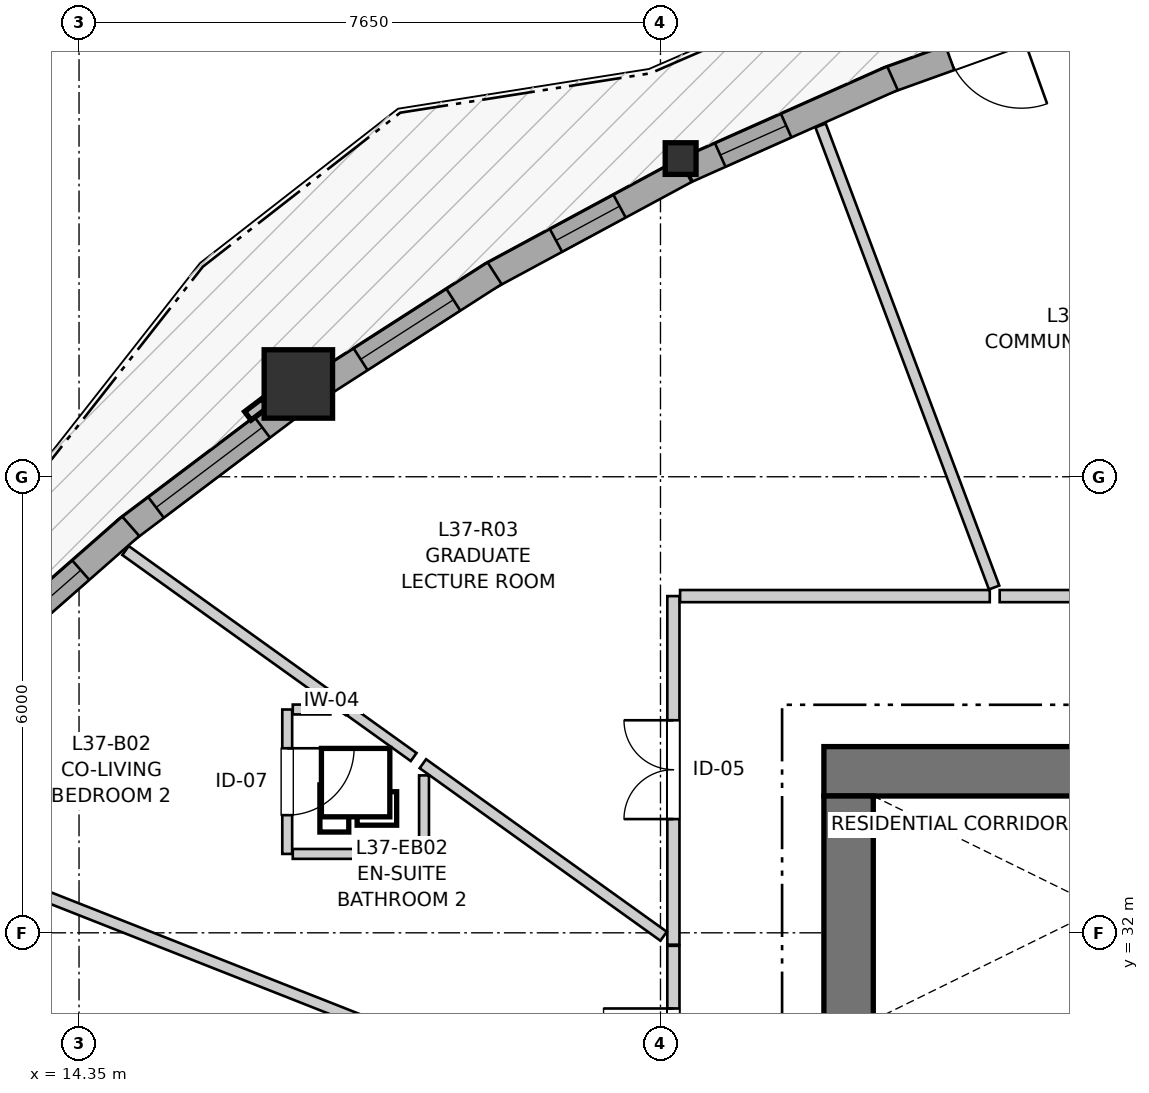
"""IFC4 building model, lengths in metres.
Left out: names, types, materials, properties, quantities, classifications, styles, units other than length and angle.
Written with IfcOpenShell. Run it as: python <this file> out.ifc"""

import sys

from ifc_helpers import new_model, si_unit, direction, frame, frame_2d, origin, origin_2d, place, context, subcontext, project, spatial, rectangle, i_section, extrude, source, transform, mapped, element, fill, save


model = new_model("IFC4")
c1 = context("Model", 3, precision=1e-05, world=origin(), true_north=direction((0.0, 1.0)))
c2 = subcontext(c1, "Body", "Model", "MODEL_VIEW")
j1 = project(units=[si_unit("LENGTHUNIT", "METRE"), si_unit("PLANEANGLEUNIT", "RADIAN")], contexts=[c1])
p1 = place(None, origin())
s1 = spatial("IfcSite", under=j1, at=p1, CompositionType="ELEMENT")
p2 = place(p1, origin())
s2 = spatial("IfcBuilding", under=s1, at=p2, CompositionType="ELEMENT")
p3 = place(p2, frame((0.0, 0.0, 124.8)))
s3 = spatial("IfcBuildingStorey", under=s2, at=p3, CompositionType="ELEMENT", Elevation=124.8)
p4 = place(p3, frame((36.55, 34.125, 0.0), z_axis=(0.0, 0.0, 1.0), x_axis=(-1.0, 0.0, 0.0)))
e1 = element("IfcWall", 1, at=p4, inside=s3, PredefinedType="SHEAR", context=c2, shape_type="SweptSolid", body=[
    extrude(rectangle(XDim=12.4, YDim=0.65, at=frame_2d((6.2, 0.0))), origin(), (0.0, 0.0, 1.0), 2.9),
])
p5 = place(p3, frame((24.475, 33.8, 0.0), z_axis=(0.0, 0.0, 1.0), x_axis=(0.0, -1.0, 0.0)))
e2 = element("IfcWall", 2, at=p5, inside=s3, PredefinedType="SHEAR", context=c2, shape_type="SweptSolid", body=[
    extrude(rectangle(XDim=15.6, YDim=0.65, at=frame_2d((7.8, 0.0))), origin(), (0.0, 0.0, 1.0), 2.9),
])
p6 = place(p5, frame((7.05, 0.0, 0.0)))
e3 = element("IfcOpeningElement", 3, at=p6, cuts=e2, PredefinedType="OPENING", context=c2, shape_type="SweptSolid", body=[
    extrude(rectangle(XDim=1.5, YDim=2.15, at=frame_2d((0.75, 1.075))), frame((0.0, 0.335, 0.0), z_axis=(0.0, -1.0, 0.0), x_axis=(1.0, 0.0, 0.0)), (0.0, 0.0, 1.0), 0.67),
])
p7 = place(p5, frame((3.52, 0.0, 0.0)))
e4 = element("IfcOpeningElement", 4, at=p7, cuts=e2, PredefinedType="OPENING", context=c2, shape_type="SweptSolid", body=[
    extrude(rectangle(XDim=0.86, YDim=2.05, at=frame_2d((0.43, 1.025))), frame((0.0, 0.335, 0.0), z_axis=(0.0, -1.0, 0.0), x_axis=(1.0, 0.0, 0.0)), (0.0, 0.0, 1.0), 0.67),
])
p8 = place(p5, frame((11.22, 0.0, 0.0)))
e5 = element("IfcOpeningElement", 5, at=p8, cuts=e2, PredefinedType="OPENING", context=c2, shape_type="SweptSolid", body=[
    extrude(rectangle(XDim=0.86, YDim=2.05, at=frame_2d((0.43, 1.025))), frame((0.0, 0.335, 0.0), z_axis=(0.0, -1.0, 0.0), x_axis=(1.0, 0.0, 0.0)), (0.0, 0.0, 1.0), 0.67),
])
m1 = source(origin(), c2, "Body", "SweptSolid", [
    extrude(i_section(OverallWidth=0.406, OverallDepth=0.416, WebThickness=0.027, FlangeThickness=0.044, FilletRadius=0.015, at=origin_2d()), origin(), (0.0, 0.0, 1.0), 2.9),
])
p9 = place(p3, frame((22.265, 42.186, 0.0), z_axis=(0.0, 0.0, 1.0), x_axis=(1.0, 0.0, 0.0)))
e6 = element("IfcColumn", 6, at=p9, inside=s3, PredefinedType="PILASTER", context=c2, shape_type="MappedRepresentation", body=[
    mapped(m1, transform((0.0, 0.0, 0.0), x_axis=(1.0, 0.0, 0.0), y_axis=(0.0, 1.0, 0.0), z_axis=(0.0, 0.0, 1.0), scale=1.0)),
])
m2 = source(origin(), c2, "Body", "SweptSolid", [
    extrude(rectangle(XDim=0.9, YDim=0.9, at=origin_2d()), origin(), (0.0, 0.0, 1.0), 2.9),
])
p10 = place(p3, frame((17.236, 39.221, 0.0), z_axis=(0.0, 0.0, 1.0), x_axis=(1.0, 0.0, 0.0)))
e7 = element("IfcColumn", 7, at=p10, inside=s3, PredefinedType="COLUMN", context=c2, shape_type="MappedRepresentation", body=[
    mapped(m2, transform((0.0, 0.0, 0.0), x_axis=(1.0, 0.0, 0.0), y_axis=(0.0, 1.0, 0.0), z_axis=(0.0, 0.0, 1.0), scale=1.0)),
])
p11 = place(p3, frame((27.586, 44.149, 0.0), z_axis=(0.0, 0.0, 1.0), x_axis=(-0.941112277287, -0.338094190338, 0.0)))
e8 = element("IfcWall", 8, at=p11, inside=s3, PredefinedType="SOLIDWALL", context=c2, shape_type="SweptSolid", body=[
    extrude(rectangle(XDim=2.779, YDim=0.34, at=frame_2d((1.39, 0.0))), origin(), (0.0, 0.0, 1.0), 2.43),
])
p12 = place(p11, frame((0.89, 0.0, 0.0)))
e9 = element("IfcOpeningElement", 9, at=p12, cuts=e8, PredefinedType="OPENING", context=c2, shape_type="SweptSolid", body=[
    extrude(rectangle(XDim=1.0, YDim=2.1, at=frame_2d((0.5, 1.05))), frame((0.0, 0.18, 0.0), z_axis=(0.0, -1.0, 0.0), x_axis=(1.0, 0.0, 0.0)), (0.0, 0.0, 1.0), 0.36),
])
p13 = place(p3, frame((25.053, 43.243, 0.0), z_axis=(0.0, 0.0, 1.0), x_axis=(-0.91339900063, -0.407065431655, 0.0)))
e10 = element("IfcWall", 10, at=p13, inside=s3, PredefinedType="SOLIDWALL", context=c2, shape_type="SweptSolid", body=[
    extrude(rectangle(XDim=2.956, YDim=0.34, at=frame_2d((1.478, 0.0))), origin(), (0.0, 0.0, 1.0), 2.43),
])
p14 = place(p13, frame((1.531, 0.0, 0.82)))
e11 = element("IfcOpeningElement", 11, at=p14, cuts=e10, PredefinedType="OPENING", context=c2, shape_type="SweptSolid", body=[
    extrude(rectangle(XDim=0.95, YDim=1.35, at=frame_2d((0.475, 0.675))), frame((0.0, 0.18, 0.0), z_axis=(0.0, -1.0, 0.0), x_axis=(1.0, 0.0, 0.0)), (0.0, 0.0, 1.0), 0.36),
])
p15 = place(p3, frame((22.328, 42.027, 0.0), z_axis=(0.0, 0.0, 1.0), x_axis=(-0.880092136679, -0.474802939077, 0.0)))
e12 = element("IfcWall", 12, at=p15, inside=s3, PredefinedType="SOLIDWALL", context=c2, shape_type="SweptSolid", body=[
    extrude(rectangle(XDim=2.94, YDim=0.34, at=frame_2d((1.47, 0.0))), origin(), (0.0, 0.0, 1.0), 2.43),
])
p16 = place(p15, frame((0.985, 0.0, 0.82)))
e13 = element("IfcOpeningElement", 13, at=p16, cuts=e12, PredefinedType="OPENING", context=c2, shape_type="SweptSolid", body=[
    extrude(rectangle(XDim=0.95, YDim=1.35, at=frame_2d((0.475, 0.675))), frame((0.0, 0.18, 0.0), z_axis=(0.0, -1.0, 0.0), x_axis=(1.0, 0.0, 0.0)), (0.0, 0.0, 1.0), 0.36),
])
p17 = place(p3, frame((19.818, 40.677, 0.0), z_axis=(0.0, 0.0, 1.0), x_axis=(-0.841503814414, -0.540251173369, 0.0)))
e14 = element("IfcWall", 14, at=p17, inside=s3, PredefinedType="SOLIDWALL", context=c2, shape_type="SweptSolid", body=[
    extrude(rectangle(XDim=2.729, YDim=0.34, at=frame_2d((1.365, 0.0))), origin(), (0.0, 0.0, 1.0), 2.43),
])
p18 = place(p17, frame((0.645, 0.0, 0.82)))
e15 = element("IfcOpeningElement", 15, at=p18, cuts=e14, PredefinedType="OPENING", context=c2, shape_type="SweptSolid", body=[
    extrude(rectangle(XDim=1.45, YDim=1.25, at=frame_2d((0.725, 0.625))), frame((0.0, 0.18, 0.0), z_axis=(0.0, -1.0, 0.0), x_axis=(1.0, 0.0, 0.0)), (0.0, 0.0, 1.0), 0.36),
])
p19 = place(p3, frame((17.154, 38.947, 0.0), z_axis=(0.0, 0.0, 1.0), x_axis=(-0.798332692302, -0.602216665663, 0.0)))
e16 = element("IfcWall", 16, at=p19, inside=s3, PredefinedType="SOLIDWALL", context=c2, shape_type="SweptSolid", body=[
    extrude(rectangle(XDim=2.746, YDim=0.34, at=frame_2d((1.373, 0.0))), origin(), (0.0, 0.0, 1.0), 2.43),
])
p20 = place(p19, frame((0.493, 0.0, 0.82)))
e17 = element("IfcOpeningElement", 17, at=p20, cuts=e16, PredefinedType="OPENING", context=c2, shape_type="SweptSolid", body=[
    extrude(rectangle(XDim=1.75, YDim=1.3, at=frame_2d((0.875, 0.65))), frame((0.0, 0.18, 0.0), z_axis=(0.0, -1.0, 0.0), x_axis=(1.0, 0.0, 0.0)), (0.0, 0.0, 1.0), 0.36),
])
p21 = place(p3, frame((15.031, 37.349, 0.0), z_axis=(0.0, 0.0, 1.0), x_axis=(-0.751472812955, -0.659764057364, 0.0)))
e18 = element("IfcWall", 18, at=p21, inside=s3, PredefinedType="SOLIDWALL", context=c2, shape_type="SweptSolid", body=[
    extrude(rectangle(XDim=2.99, YDim=0.34, at=frame_2d((1.495, 0.0))), origin(), (0.0, 0.0, 1.0), 2.43),
])
p22 = place(p21, frame((0.875, 0.0, 0.82)))
e19 = element("IfcOpeningElement", 19, at=p22, cuts=e18, PredefinedType="OPENING", context=c2, shape_type="SweptSolid", body=[
    extrude(rectangle(XDim=1.45, YDim=1.25, at=frame_2d((0.725, 0.625))), frame((0.0, 0.18, 0.0), z_axis=(0.0, -1.0, 0.0), x_axis=(1.0, 0.0, 0.0)), (0.0, 0.0, 1.0), 0.36),
])
p23 = place(p3, frame((22.17, 31.844, 0.0), z_axis=(0.0, 0.0, 1.0), x_axis=(0.0, 1.0, 0.0)))
e20 = element("IfcWall", 20, at=p23, inside=s3, PredefinedType="PARTITIONING", context=c2, shape_type="SweptSolid", body=[
    extrude(rectangle(XDim=4.586, YDim=0.16, at=frame_2d((2.293, 0.0))), origin(), (0.0, 0.0, 1.0), 2.9),
])
p24 = place(p23, frame((1.653, 0.0, 0.0)))
e21 = element("IfcOpeningElement", 21, at=p24, cuts=e20, PredefinedType="OPENING", context=c2, shape_type="SweptSolid", body=[
    extrude(rectangle(XDim=1.3, YDim=2.1, at=frame_2d((0.65, 1.05))), frame((0.0, 0.09, 0.0), z_axis=(0.0, -1.0, 0.0), x_axis=(1.0, 0.0, 0.0)), (0.0, 0.0, 1.0), 0.18),
])
p25 = place(p3, frame((26.463, 36.43, 0.0), z_axis=(0.0, 0.0, 1.0), x_axis=(1.0, 0.0, 0.0)))
e22 = element("IfcWall", 22, at=p25, inside=s3, PredefinedType="PARTITIONING", context=c2, shape_type="SweptSolid", body=[
    extrude(rectangle(XDim=3.585, YDim=0.16, at=frame_2d((1.792, 0.0))), origin(), (0.0, 0.0, 1.0), 2.9),
])
p26 = place(p25, frame((1.119, 0.0, 0.0)))
e23 = element("IfcOpeningElement", 23, at=p26, cuts=e22, PredefinedType="OPENING", context=c2, shape_type="SweptSolid", body=[
    extrude(rectangle(XDim=1.3, YDim=2.1, at=frame_2d((0.65, 1.05))), frame((0.0, 0.09, 0.0), z_axis=(0.0, -1.0, 0.0), x_axis=(1.0, 0.0, 0.0)), (0.0, 0.0, 1.0), 0.18),
])
p27 = place(p3, frame((22.17, 29.209, 0.0), z_axis=(0.0, 0.0, 1.0), x_axis=(0.0, 1.0, 0.0)))
e24 = element("IfcWall", 24, at=p27, inside=s3, PredefinedType="PARTITIONING", context=c2, shape_type="SweptSolid", body=[
    extrude(rectangle(XDim=2.62, YDim=0.16, at=frame_2d((1.31, 0.0))), origin(), (0.0, 0.0, 1.0), 2.9),
])
p28 = place(p27, frame((0.875, 0.0, 0.0)))
e25 = element("IfcOpeningElement", 25, at=p28, cuts=e24, PredefinedType="OPENING", context=c2, shape_type="SweptSolid", body=[
    extrude(rectangle(XDim=0.92, YDim=2.1, at=frame_2d((0.46, 1.05))), frame((0.0, 0.09, 0.0), z_axis=(0.0, -1.0, 0.0), x_axis=(1.0, 0.0, 0.0)), (0.0, 0.0, 1.0), 0.18),
])
p29 = place(p3, frame((17.089, 34.938, 0.0), z_axis=(0.0, 0.0, 1.0), x_axis=(0.0, -1.0, 0.0)))
e26 = element("IfcWall", 26, at=p29, inside=s3, PredefinedType="PARTITIONING", context=c2, shape_type="SweptSolid", body=[
    extrude(rectangle(XDim=1.9, YDim=0.13, at=frame_2d((0.95, 0.0))), origin(), (0.0, 0.0, 1.0), 2.9),
])
p30 = place(p29, frame((0.51, 0.0, 0.0)))
e27 = element("IfcOpeningElement", 27, at=p30, cuts=e26, PredefinedType="OPENING", context=c2, shape_type="SweptSolid", body=[
    extrude(rectangle(XDim=0.88, YDim=2.05, at=frame_2d((0.44, 1.025))), frame((0.0, 0.075, 0.0), z_axis=(0.0, -1.0, 0.0), x_axis=(1.0, 0.0, 0.0)), (0.0, 0.0, 1.0), 0.15),
])
p31 = place(p3, frame((11.228, 33.54, 0.0), z_axis=(0.0, 0.0, 1.0), x_axis=(0.930301058265, -0.366796866114, 0.0)))
e28 = element("IfcWall", 28, at=p31, inside=s3, PredefinedType="PARTITIONING", context=c2, shape_type="SweptSolid", body=[
    extrude(rectangle(XDim=11.639, YDim=0.145, at=frame_2d((5.82, 0.0))), origin(), (0.0, 0.0, 1.0), 2.9),
])
p32 = place(p3, frame((24.107, 42.621, 0.0), z_axis=(0.0, 0.0, 1.0), x_axis=(0.351605509999, -0.93614826034, 0.0)))
e29 = element("IfcWall", 29, at=p32, inside=s3, PredefinedType="PARTITIONING", context=c2, shape_type="SweptSolid", body=[
    extrude(rectangle(XDim=6.493, YDim=0.145, at=frame_2d((3.247, 0.0))), origin(), (0.0, 0.0, 1.0), 2.9),
])
p33 = place(p3, frame((22.258, 36.43, 0.0), z_axis=(0.0, 0.0, 1.0), x_axis=(1.0, 0.0, 0.0)))
e30 = element("IfcWall", 30, at=p33, inside=s3, PredefinedType="PARTITIONING", context=c2, shape_type="SweptSolid", body=[
    extrude(rectangle(XDim=4.074, YDim=0.16, at=frame_2d((2.037, 0.0))), origin(), (0.0, 0.0, 1.0), 2.538),
])
p34 = place(p3, frame((18.874, 34.225, 0.0), z_axis=(0.0, 0.0, 1.0), x_axis=(0.812826521731, -0.582505833079, 0.0)))
e31 = element("IfcWall", 31, at=p34, inside=s3, PredefinedType="PARTITIONING", context=c2, shape_type="SweptSolid", body=[
    extrude(rectangle(XDim=3.896, YDim=0.145, at=frame_2d((1.948, 0.0))), origin(), (0.0, 0.0, 1.0), 2.9),
])
p35 = place(p3, frame((14.961, 37.03, 0.0), z_axis=(0.0, 0.0, 1.0), x_axis=(0.812838437321, -0.582489205748, 0.0)))
e32 = element("IfcWall", 32, at=p35, inside=s3, PredefinedType="PARTITIONING", context=c2, shape_type="SweptSolid", body=[
    extrude(rectangle(XDim=3.616, YDim=0.145, at=frame_2d((1.808, 0.0))), origin(), (0.0, 0.0, 1.0), 2.9),
])
p36 = place(p3, frame((17.162, 33.038, 0.0), z_axis=(0.0, 0.0, 1.0), x_axis=(1.0, 0.0, 0.0)))
e33 = element("IfcWall", 33, at=p36, inside=s3, PredefinedType="PARTITIONING", context=c2, shape_type="SweptSolid", body=[
    extrude(rectangle(XDim=1.727, YDim=0.13, at=frame_2d((0.863, 0.0))), origin(), (0.0, 0.0, 1.0), 2.9),
])
p37 = place(p3, frame((18.889, 33.111, 0.0), z_axis=(0.0, 0.0, 1.0), x_axis=(0.0, 1.0, 0.0)))
e34 = element("IfcWall", 34, at=p37, inside=s3, PredefinedType="PARTITIONING", context=c2, shape_type="SweptSolid", body=[
    extrude(rectangle(XDim=0.96, YDim=0.13, at=frame_2d((0.48, 0.0))), origin(), (0.0, 0.0, 1.0), 2.9),
])
p38 = place(p3, frame((17.913, 34.914, 0.0), z_axis=(0.0, 0.0, 1.0), x_axis=(0.812774229327, -0.582578794792, 0.0)))
e35 = element("IfcWall", 35, at=p38, inside=s3, PredefinedType="PARTITIONING", context=c2, shape_type="SweptSolid", body=[
    extrude(rectangle(XDim=1.033, YDim=0.13, at=frame_2d((0.517, 0.0))), origin(), (0.0, 0.0, 1.0), 2.9),
])
p39 = place(p3, frame((17.162, 34.938, 0.0), z_axis=(0.0, 0.0, 1.0), x_axis=(1.0, 0.0, 0.0)))
e36 = element("IfcWall", 36, at=p39, inside=s3, PredefinedType="PARTITIONING", context=c2, shape_type="SweptSolid", body=[
    extrude(rectangle(XDim=0.495, YDim=0.13, at=frame_2d((0.247, 0.0))), origin(), (0.0, 0.0, 1.0), 2.9),
])
m3 = source(origin(), c2, "Body", "SweptSolid", [
    extrude(rectangle(XDim=0.95, YDim=1.35, at=frame_2d((0.475, 0.675))), frame((0.0, 0.03, 0.0), z_axis=(0.0, -1.0, 0.0), x_axis=(1.0, 0.0, 0.0)), (0.0, 0.0, 1.0), 0.06),
])
p40 = place(p14, origin())
e37 = element("IfcWindow", 37, at=p40, inside=s3, PartitioningType="SINGLE_PANEL", PredefinedType="WINDOW", context=c2, shape_type="MappedRepresentation", body=[
    mapped(m3, transform((0.0, 0.0, 0.0), x_axis=(1.0, 0.0, 0.0), y_axis=(0.0, 1.0, 0.0), z_axis=(0.0, 0.0, 1.0), scale=1.0)),
])
fill(e11, e37)
p41 = place(p16, origin())
e38 = element("IfcWindow", 38, at=p41, inside=s3, PartitioningType="SINGLE_PANEL", PredefinedType="WINDOW", context=c2, shape_type="MappedRepresentation", body=[
    mapped(m3, transform((0.0, 0.0, 0.0), x_axis=(1.0, 0.0, 0.0), y_axis=(0.0, 1.0, 0.0), z_axis=(0.0, 0.0, 1.0), scale=1.0)),
])
fill(e13, e38)
m4 = source(origin(), c2, "Body", "SweptSolid", [
    extrude(rectangle(XDim=1.45, YDim=1.25, at=frame_2d((0.725, 0.625))), frame((0.0, 0.03, 0.0), z_axis=(0.0, -1.0, 0.0), x_axis=(1.0, 0.0, 0.0)), (0.0, 0.0, 1.0), 0.06),
])
p42 = place(p18, origin())
e39 = element("IfcWindow", 39, at=p42, inside=s3, PartitioningType="SINGLE_PANEL", PredefinedType="WINDOW", context=c2, shape_type="MappedRepresentation", body=[
    mapped(m4, transform((0.0, 0.0, 0.0), x_axis=(1.0, 0.0, 0.0), y_axis=(0.0, 1.0, 0.0), z_axis=(0.0, 0.0, 1.0), scale=1.0)),
])
fill(e15, e39)
m5 = source(origin(), c2, "Body", "SweptSolid", [
    extrude(rectangle(XDim=1.75, YDim=1.3, at=frame_2d((0.875, 0.65))), frame((0.0, 0.03, 0.0), z_axis=(0.0, -1.0, 0.0), x_axis=(1.0, 0.0, 0.0)), (0.0, 0.0, 1.0), 0.06),
])
p43 = place(p20, origin())
e40 = element("IfcWindow", 40, at=p43, inside=s3, PartitioningType="SINGLE_PANEL", PredefinedType="WINDOW", context=c2, shape_type="MappedRepresentation", body=[
    mapped(m5, transform((0.0, 0.0, 0.0), x_axis=(1.0, 0.0, 0.0), y_axis=(0.0, 1.0, 0.0), z_axis=(0.0, 0.0, 1.0), scale=1.0)),
])
fill(e17, e40)
p44 = place(p22, origin())
e41 = element("IfcWindow", 41, at=p44, inside=s3, PartitioningType="SINGLE_PANEL", PredefinedType="WINDOW", context=c2, shape_type="MappedRepresentation", body=[
    mapped(m4, transform((0.0, 0.0, 0.0), x_axis=(1.0, 0.0, 0.0), y_axis=(0.0, 1.0, 0.0), z_axis=(0.0, 0.0, 1.0), scale=1.0)),
])
fill(e19, e41)
m6 = source(origin(), c2, "Body", "SweptSolid", [
    extrude(rectangle(XDim=1.0, YDim=2.1, at=frame_2d((0.5, 1.05))), frame((0.0, 0.025, 0.0), z_axis=(0.0, -1.0, 0.0), x_axis=(1.0, 0.0, 0.0)), (0.0, 0.0, 1.0), 0.05),
])
p45 = place(p12, origin())
e42 = element("IfcDoor", 42, at=p45, inside=s3, OperationType="SINGLE_SWING_LEFT", PredefinedType="DOOR", context=c2, shape_type="MappedRepresentation", body=[
    mapped(m6, transform((0.0, 0.0, 0.0), x_axis=(1.0, 0.0, 0.0), y_axis=(0.0, 1.0, 0.0), z_axis=(0.0, 0.0, 1.0), scale=1.0)),
])
fill(e9, e42)
m7 = source(origin(), c2, "Body", "SweptSolid", [
    extrude(rectangle(XDim=1.3, YDim=2.1, at=frame_2d((0.65, 1.05))), frame((0.0, 0.025, 0.0), z_axis=(0.0, -1.0, 0.0), x_axis=(1.0, 0.0, 0.0)), (0.0, 0.0, 1.0), 0.05),
])
p46 = place(p24, origin())
e43 = element("IfcDoor", 43, at=p46, inside=s3, OperationType="DOUBLE_DOOR_SINGLE_SWING", PredefinedType="DOOR", context=c2, shape_type="MappedRepresentation", body=[
    mapped(m7, transform((0.0, 0.0, 0.0), x_axis=(1.0, 0.0, 0.0), y_axis=(0.0, 1.0, 0.0), z_axis=(0.0, 0.0, 1.0), scale=1.0)),
])
fill(e21, e43)
m8 = source(origin(), c2, "Body", "SweptSolid", [
    extrude(rectangle(XDim=0.92, YDim=2.1, at=frame_2d((0.46, 1.05))), frame((0.0, 0.025, 0.0), z_axis=(0.0, -1.0, 0.0), x_axis=(1.0, 0.0, 0.0)), (0.0, 0.0, 1.0), 0.05),
])
p47 = place(p28, origin())
e44 = element("IfcDoor", 44, at=p47, inside=s3, OperationType="SINGLE_SWING_RIGHT", PredefinedType="DOOR", context=c2, shape_type="MappedRepresentation", body=[
    mapped(m8, transform((0.0, 0.0, 0.0), x_axis=(1.0, 0.0, 0.0), y_axis=(0.0, 1.0, 0.0), z_axis=(0.0, 0.0, 1.0), scale=1.0)),
])
fill(e25, e44)
m9 = source(origin(), c2, "Body", "SweptSolid", [
    extrude(rectangle(XDim=0.88, YDim=2.05, at=frame_2d((0.44, 1.025))), frame((0.0, 0.025, 0.0), z_axis=(0.0, -1.0, 0.0), x_axis=(1.0, 0.0, 0.0)), (0.0, 0.0, 1.0), 0.05),
])
p48 = place(p30, origin())
e45 = element("IfcDoor", 45, at=p48, inside=s3, OperationType="SINGLE_SWING_LEFT", PredefinedType="DOOR", context=c2, shape_type="MappedRepresentation", body=[
    mapped(m9, transform((0.0, 0.0, 0.0), x_axis=(1.0, 0.0, 0.0), y_axis=(0.0, 1.0, 0.0), z_axis=(0.0, 0.0, 1.0), scale=1.0)),
])
fill(e27, e45)
save(model, sys.argv[1])
